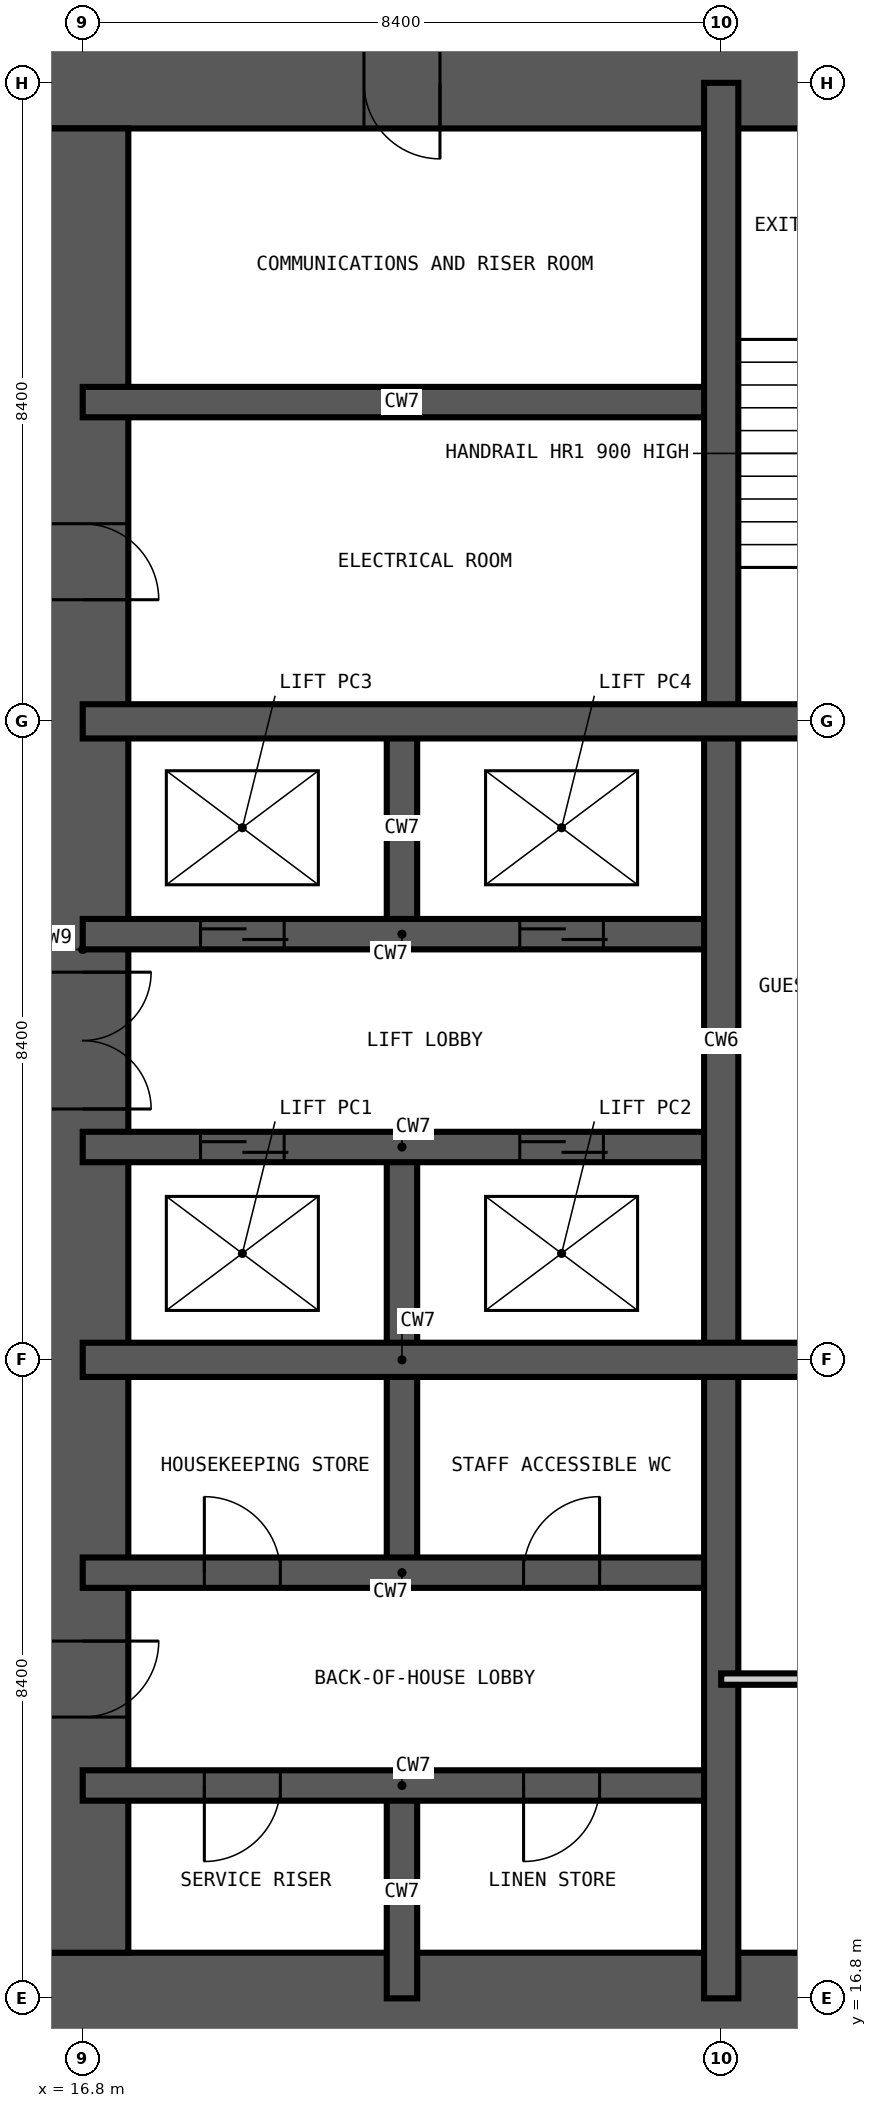
"""IFC4 building model, lengths in metres.
Left out: names, types, materials, properties, quantities, classifications, styles, units other than length and angle.
Written with IfcOpenShell. Run it as: python <this file> out.ifc"""

import sys

from ifc_helpers import new_model, si_unit, direction, frame, frame_2d, origin, place, context, subcontext, project, spatial, rectangle, extrude, element, fill, save


model = new_model("IFC4")
c1 = context("Model", 3, precision=1e-05, world=origin(), true_north=direction((0.0, 1.0)))
c2 = subcontext(c1, "Body", "Model", "MODEL_VIEW")
j1 = project(units=[si_unit("LENGTHUNIT", "METRE"), si_unit("PLANEANGLEUNIT", "RADIAN")], contexts=[c1])
p1 = place(None, origin())
s1 = spatial("IfcSite", under=j1, at=p1, CompositionType="ELEMENT")
p2 = place(p1, origin())
s2 = spatial("IfcBuilding", under=s1, at=p2, CompositionType="ELEMENT")
p3 = place(p2, frame((0.0, 0.0, 213.0)))
s3 = spatial("IfcBuildingStorey", under=s2, at=p3, CompositionType="ELEMENT", Elevation=213.0)
p4 = place(p3, frame((16.2, 16.8, -0.35), z_axis=(0.0, 0.0, 1.0), x_axis=(1.0, 0.0, 0.0)))
e1 = element("IfcWall", 1, at=p4, inside=s3, PredefinedType="SHEAR", context=c2, shape_type="SweptSolid", body=[
    extrude(rectangle(XDim=26.4, YDim=1.2, at=frame_2d((13.2, 0.0))), origin(), (0.0, 0.0, 1.0), 3.6),
])
p5 = place(p4, frame((12.7, 0.0, 0.35)))
e2 = element("IfcOpeningElement", 2, at=p5, cuts=e1, PredefinedType="OPENING", context=c2, shape_type="SweptSolid", body=[
    extrude(rectangle(XDim=1.0, YDim=2.1, at=frame_2d((0.5, 1.05))), frame((0.0, 0.61, 0.0), z_axis=(0.0, -1.0, 0.0), x_axis=(1.0, 0.0, 0.0)), (0.0, 0.0, 1.0), 1.22),
])
p6 = place(p4, frame((19.0, 0.0, 0.35)))
e3 = element("IfcOpeningElement", 3, at=p6, cuts=e1, PredefinedType="OPENING", context=c2, shape_type="SweptSolid", body=[
    extrude(rectangle(XDim=1.0, YDim=2.1, at=frame_2d((0.5, 1.05))), frame((0.0, 0.61, 0.0), z_axis=(0.0, -1.0, 0.0), x_axis=(1.0, 0.0, 0.0)), (0.0, 0.0, 1.0), 1.22),
])
p7 = place(p3, frame((42.6, 42.0, -0.35), z_axis=(0.0, 0.0, 1.0), x_axis=(-1.0, 0.0, 0.0)))
e4 = element("IfcWall", 4, at=p7, inside=s3, PredefinedType="SHEAR", context=c2, shape_type="SweptSolid", body=[
    extrude(rectangle(XDim=26.4, YDim=1.2, at=frame_2d((13.2, 0.0))), origin(), (0.0, 0.0, 1.0), 3.6),
])
p8 = place(p7, frame((21.1, 0.0, 0.35)))
e5 = element("IfcOpeningElement", 5, at=p8, cuts=e4, PredefinedType="OPENING", context=c2, shape_type="SweptSolid", body=[
    extrude(rectangle(XDim=1.0, YDim=2.1, at=frame_2d((0.5, 1.05))), frame((0.0, 0.61, 0.0), z_axis=(0.0, -1.0, 0.0), x_axis=(1.0, 0.0, 0.0)), (0.0, 0.0, 1.0), 1.22),
])
p9 = place(p7, frame((10.5, 0.0, 0.35)))
e6 = element("IfcOpeningElement", 6, at=p9, cuts=e4, PredefinedType="OPENING", context=c2, shape_type="SweptSolid", body=[
    extrude(rectangle(XDim=1.2, YDim=2.2, at=frame_2d((0.6, 1.1))), frame((0.0, 0.61, 0.0), z_axis=(0.0, -1.0, 0.0), x_axis=(1.0, 0.0, 0.0)), (0.0, 0.0, 1.0), 1.22),
])
p10 = place(p3, frame((16.8, 41.4, -0.35), z_axis=(0.0, 0.0, 1.0), x_axis=(0.0, -1.0, 0.0)))
e7 = element("IfcWall", 7, at=p10, inside=s3, PredefinedType="SHEAR", context=c2, shape_type="SweptSolid", body=[
    extrude(rectangle(XDim=24.0, YDim=1.2, at=frame_2d((12.0, 0.0))), origin(), (0.0, 0.0, 1.0), 3.6),
])
p11 = place(p10, frame((11.1, 0.0, 0.35)))
e8 = element("IfcOpeningElement", 8, at=p11, cuts=e7, PredefinedType="OPENING", context=c2, shape_type="SweptSolid", body=[
    extrude(rectangle(XDim=1.8, YDim=2.2, at=frame_2d((0.9, 1.1))), frame((0.0, 0.61, 0.0), z_axis=(0.0, -1.0, 0.0), x_axis=(1.0, 0.0, 0.0)), (0.0, 0.0, 1.0), 1.22),
])
p12 = place(p10, frame((19.9, 0.0, 0.35)))
e9 = element("IfcOpeningElement", 9, at=p12, cuts=e7, PredefinedType="OPENING", context=c2, shape_type="SweptSolid", body=[
    extrude(rectangle(XDim=1.0, YDim=2.1, at=frame_2d((0.5, 1.05))), frame((0.0, 0.61, 0.0), z_axis=(0.0, -1.0, 0.0), x_axis=(1.0, 0.0, 0.0)), (0.0, 0.0, 1.0), 1.22),
])
p13 = place(p10, frame((5.2, 0.0, 0.35)))
e10 = element("IfcOpeningElement", 10, at=p13, cuts=e7, PredefinedType="OPENING", context=c2, shape_type="SweptSolid", body=[
    extrude(rectangle(XDim=1.0, YDim=2.1, at=frame_2d((0.5, 1.05))), frame((0.0, 0.61, 0.0), z_axis=(0.0, -1.0, 0.0), x_axis=(1.0, 0.0, 0.0)), (0.0, 0.0, 1.0), 1.22),
])
p14 = place(p3, frame((21.0, 16.8, -0.35), z_axis=(0.0, 0.0, 1.0), x_axis=(0.0, 1.0, 0.0)))
e11 = element("IfcWall", 11, at=p14, inside=s3, PredefinedType="SHEAR", context=c2, shape_type="SweptSolid", body=[
    extrude(rectangle(XDim=2.8, YDim=0.4, at=frame_2d((1.4, 0.0))), origin(), (0.0, 0.0, 1.0), 3.6),
])
p15 = place(p3, frame((21.0, 22.4, -0.35), z_axis=(0.0, 0.0, 1.0), x_axis=(0.0, 1.0, 0.0)))
e12 = element("IfcWall", 12, at=p15, inside=s3, PredefinedType="SHEAR", context=c2, shape_type="SweptSolid", body=[
    extrude(rectangle(XDim=5.6, YDim=0.4, at=frame_2d((2.8, 0.0))), origin(), (0.0, 0.0, 1.0), 3.6),
])
p16 = place(p3, frame((21.0, 30.8, -0.35), z_axis=(0.0, 0.0, 1.0), x_axis=(0.0, 1.0, 0.0)))
e13 = element("IfcWall", 13, at=p16, inside=s3, PredefinedType="SHEAR", context=c2, shape_type="SweptSolid", body=[
    extrude(rectangle(XDim=2.8, YDim=0.4, at=frame_2d((1.4, 0.0))), origin(), (0.0, 0.0, 1.0), 3.6),
])
p17 = place(p3, frame((16.8, 19.6, -0.35), z_axis=(0.0, 0.0, 1.0), x_axis=(1.0, 0.0, 0.0)))
e14 = element("IfcWall", 14, at=p17, inside=s3, PredefinedType="SHEAR", context=c2, shape_type="SweptSolid", body=[
    extrude(rectangle(XDim=8.4, YDim=0.4, at=frame_2d((4.2, 0.0))), origin(), (0.0, 0.0, 1.0), 3.6),
])
p18 = place(p17, frame((1.6, 0.0, 0.35)))
e15 = element("IfcOpeningElement", 15, at=p18, cuts=e14, PredefinedType="OPENING", context=c2, shape_type="SweptSolid", body=[
    extrude(rectangle(XDim=1.0, YDim=2.1, at=frame_2d((0.5, 1.05))), frame((0.0, 0.21, 0.0), z_axis=(0.0, -1.0, 0.0), x_axis=(1.0, 0.0, 0.0)), (0.0, 0.0, 1.0), 0.42),
])
p19 = place(p17, frame((5.8, 0.0, 0.35)))
e16 = element("IfcOpeningElement", 16, at=p19, cuts=e14, PredefinedType="OPENING", context=c2, shape_type="SweptSolid", body=[
    extrude(rectangle(XDim=1.0, YDim=2.1, at=frame_2d((0.5, 1.05))), frame((0.0, 0.21, 0.0), z_axis=(0.0, -1.0, 0.0), x_axis=(1.0, 0.0, 0.0)), (0.0, 0.0, 1.0), 0.42),
])
p20 = place(p3, frame((16.8, 22.4, -0.35), z_axis=(0.0, 0.0, 1.0), x_axis=(1.0, 0.0, 0.0)))
e17 = element("IfcWall", 17, at=p20, inside=s3, PredefinedType="SHEAR", context=c2, shape_type="SweptSolid", body=[
    extrude(rectangle(XDim=8.4, YDim=0.4, at=frame_2d((4.2, 0.0))), origin(), (0.0, 0.0, 1.0), 3.6),
])
p21 = place(p20, frame((1.6, 0.0, 0.35)))
e18 = element("IfcOpeningElement", 18, at=p21, cuts=e17, PredefinedType="OPENING", context=c2, shape_type="SweptSolid", body=[
    extrude(rectangle(XDim=1.0, YDim=2.1, at=frame_2d((0.5, 1.05))), frame((0.0, 0.21, 0.0), z_axis=(0.0, -1.0, 0.0), x_axis=(1.0, 0.0, 0.0)), (0.0, 0.0, 1.0), 0.42),
])
p22 = place(p20, frame((5.8, 0.0, 0.35)))
e19 = element("IfcOpeningElement", 19, at=p22, cuts=e17, PredefinedType="OPENING", context=c2, shape_type="SweptSolid", body=[
    extrude(rectangle(XDim=1.0, YDim=2.1, at=frame_2d((0.5, 1.05))), frame((0.0, 0.21, 0.0), z_axis=(0.0, -1.0, 0.0), x_axis=(1.0, 0.0, 0.0)), (0.0, 0.0, 1.0), 0.42),
])
p23 = place(p3, frame((16.8, 28.0, -0.35), z_axis=(0.0, 0.0, 1.0), x_axis=(1.0, 0.0, 0.0)))
e20 = element("IfcWall", 20, at=p23, inside=s3, PredefinedType="SHEAR", context=c2, shape_type="SweptSolid", body=[
    extrude(rectangle(XDim=8.4, YDim=0.4, at=frame_2d((4.2, 0.0))), origin(), (0.0, 0.0, 1.0), 3.6),
])
p24 = place(p23, frame((1.55, 0.0, 0.35)))
e21 = element("IfcOpeningElement", 21, at=p24, cuts=e20, PredefinedType="OPENING", context=c2, shape_type="SweptSolid", body=[
    extrude(rectangle(XDim=1.1, YDim=2.2, at=frame_2d((0.55, 1.1))), frame((0.0, 0.21, 0.0), z_axis=(0.0, -1.0, 0.0), x_axis=(1.0, 0.0, 0.0)), (0.0, 0.0, 1.0), 0.42),
])
p25 = place(p23, frame((5.75, 0.0, 0.35)))
e22 = element("IfcOpeningElement", 22, at=p25, cuts=e20, PredefinedType="OPENING", context=c2, shape_type="SweptSolid", body=[
    extrude(rectangle(XDim=1.1, YDim=2.2, at=frame_2d((0.55, 1.1))), frame((0.0, 0.21, 0.0), z_axis=(0.0, -1.0, 0.0), x_axis=(1.0, 0.0, 0.0)), (0.0, 0.0, 1.0), 0.42),
])
p26 = place(p3, frame((16.8, 30.8, -0.35), z_axis=(0.0, 0.0, 1.0), x_axis=(1.0, 0.0, 0.0)))
e23 = element("IfcWall", 23, at=p26, inside=s3, PredefinedType="SHEAR", context=c2, shape_type="SweptSolid", body=[
    extrude(rectangle(XDim=8.4, YDim=0.4, at=frame_2d((4.2, 0.0))), origin(), (0.0, 0.0, 1.0), 3.6),
])
p27 = place(p26, frame((1.55, 0.0, 0.35)))
e24 = element("IfcOpeningElement", 24, at=p27, cuts=e23, PredefinedType="OPENING", context=c2, shape_type="SweptSolid", body=[
    extrude(rectangle(XDim=1.1, YDim=2.2, at=frame_2d((0.55, 1.1))), frame((0.0, 0.21, 0.0), z_axis=(0.0, -1.0, 0.0), x_axis=(1.0, 0.0, 0.0)), (0.0, 0.0, 1.0), 0.42),
])
p28 = place(p26, frame((5.75, 0.0, 0.35)))
e25 = element("IfcOpeningElement", 25, at=p28, cuts=e23, PredefinedType="OPENING", context=c2, shape_type="SweptSolid", body=[
    extrude(rectangle(XDim=1.1, YDim=2.2, at=frame_2d((0.55, 1.1))), frame((0.0, 0.21, 0.0), z_axis=(0.0, -1.0, 0.0), x_axis=(1.0, 0.0, 0.0)), (0.0, 0.0, 1.0), 0.42),
])
p29 = place(p3, frame((16.8, 37.8, -0.35), z_axis=(0.0, 0.0, 1.0), x_axis=(1.0, 0.0, 0.0)))
e26 = element("IfcWall", 26, at=p29, inside=s3, PredefinedType="SHEAR", context=c2, shape_type="SweptSolid", body=[
    extrude(rectangle(XDim=8.4, YDim=0.4, at=frame_2d((4.2, 0.0))), origin(), (0.0, 0.0, 1.0), 3.6),
])
for number, where, z_axis, x_axis in (
    (27, (25.2, 16.8, -0.35), (0.0, 0.0, 1.0), (0.0, 1.0, 0.0)),
    (28, (16.8, 25.2, -0.35), (0.0, 0.0, 1.0), (1.0, 0.0, 0.0)),
    (29, (16.8, 33.6, -0.35), (0.0, 0.0, 1.0), (1.0, 0.0, 0.0)),
):
    element("IfcWall", number, at=place(p3, frame(where, z_axis=z_axis, x_axis=x_axis)), inside=s3, PredefinedType="SHEAR", context=c2, shape_type="SweptSolid", body=[
        extrude(rectangle(XDim=25.2, YDim=0.45, at=frame_2d((12.6, 0.0))), origin(), (0.0, 0.0, 1.0), 3.6),
    ])
p30 = place(p3, frame((25.2, 21.0, 0.0), z_axis=(0.0, 0.0, 1.0), x_axis=(1.0, 0.0, 0.0)))
e30 = element("IfcWall", 30, at=p30, inside=s3, PredefinedType="PARTITIONING", context=c2, shape_type="SweptSolid", body=[
    extrude(rectangle(XDim=8.4, YDim=0.15, at=frame_2d((4.2, 0.0))), origin(), (0.0, 0.0, 1.0), 3.25),
])
p31 = place(p30, frame((3.7, 0.0, 0.0)))
e31 = element("IfcOpeningElement", 31, at=p31, cuts=e30, PredefinedType="OPENING", context=c2, shape_type="SweptSolid", body=[
    extrude(rectangle(XDim=1.0, YDim=2.1, at=frame_2d((0.5, 1.05))), frame((0.0, 0.085, 0.0), z_axis=(0.0, -1.0, 0.0), x_axis=(1.0, 0.0, 0.0)), (0.0, 0.0, 1.0), 0.17),
])
p32 = place(p24, origin())
e32 = element("IfcDoor", 32, at=p32, inside=s3, OperationType="DOUBLE_DOOR_SLIDING", PredefinedType="DOOR", context=c2, shape_type="SweptSolid", body=[
    extrude(rectangle(XDim=1.1, YDim=2.2, at=frame_2d((0.55, 1.1))), frame((0.0, 0.025, 0.0), z_axis=(0.0, -1.0, 0.0), x_axis=(1.0, 0.0, 0.0)), (0.0, 0.0, 1.0), 0.05),
])
fill(e21, e32)
p33 = place(p25, origin())
e33 = element("IfcDoor", 33, at=p33, inside=s3, OperationType="DOUBLE_DOOR_SLIDING", PredefinedType="DOOR", context=c2, shape_type="SweptSolid", body=[
    extrude(rectangle(XDim=1.1, YDim=2.2, at=frame_2d((0.55, 1.1))), frame((0.0, 0.025, 0.0), z_axis=(0.0, -1.0, 0.0), x_axis=(1.0, 0.0, 0.0)), (0.0, 0.0, 1.0), 0.05),
])
fill(e22, e33)
p34 = place(p27, origin())
e34 = element("IfcDoor", 34, at=p34, inside=s3, OperationType="DOUBLE_DOOR_SLIDING", PredefinedType="DOOR", context=c2, shape_type="SweptSolid", body=[
    extrude(rectangle(XDim=1.1, YDim=2.2, at=frame_2d((0.55, 1.1))), frame((0.0, 0.025, 0.0), z_axis=(0.0, -1.0, 0.0), x_axis=(1.0, 0.0, 0.0)), (0.0, 0.0, 1.0), 0.05),
])
fill(e24, e34)
p35 = place(p28, origin())
e35 = element("IfcDoor", 35, at=p35, inside=s3, OperationType="DOUBLE_DOOR_SLIDING", PredefinedType="DOOR", context=c2, shape_type="SweptSolid", body=[
    extrude(rectangle(XDim=1.1, YDim=2.2, at=frame_2d((0.55, 1.1))), frame((0.0, 0.025, 0.0), z_axis=(0.0, -1.0, 0.0), x_axis=(1.0, 0.0, 0.0)), (0.0, 0.0, 1.0), 0.05),
])
fill(e25, e35)
p36 = place(p11, origin())
e36 = element("IfcDoor", 36, at=p36, inside=s3, OperationType="DOUBLE_DOOR_DOUBLE_SWING", PredefinedType="DOOR", context=c2, shape_type="SweptSolid", body=[
    extrude(rectangle(XDim=1.8, YDim=2.2, at=frame_2d((0.9, 1.1))), frame((0.0, 0.025, 0.0), z_axis=(0.0, -1.0, 0.0), x_axis=(1.0, 0.0, 0.0)), (0.0, 0.0, 1.0), 0.05),
])
fill(e8, e36)
p37 = place(p18, frame((1.0, 0.0, 0.0), z_axis=(0.0, 0.0, 1.0), x_axis=(-1.0, 0.0, 0.0)))
e37 = element("IfcDoor", 37, at=p37, inside=s3, OperationType="SINGLE_SWING_RIGHT", PredefinedType="DOOR", context=c2, shape_type="SweptSolid", body=[
    extrude(rectangle(XDim=1.0, YDim=2.1, at=frame_2d((0.5, 1.05))), frame((0.0, 0.025, 0.0), z_axis=(0.0, -1.0, 0.0), x_axis=(1.0, 0.0, 0.0)), (0.0, 0.0, 1.0), 0.05),
])
fill(e15, e37)
p38 = place(p19, frame((1.0, 0.0, 0.0), z_axis=(0.0, 0.0, 1.0), x_axis=(-1.0, 0.0, 0.0)))
e38 = element("IfcDoor", 38, at=p38, inside=s3, OperationType="SINGLE_SWING_RIGHT", PredefinedType="DOOR", context=c2, shape_type="SweptSolid", body=[
    extrude(rectangle(XDim=1.0, YDim=2.1, at=frame_2d((0.5, 1.05))), frame((0.0, 0.025, 0.0), z_axis=(0.0, -1.0, 0.0), x_axis=(1.0, 0.0, 0.0)), (0.0, 0.0, 1.0), 0.05),
])
fill(e16, e38)
p39 = place(p21, origin())
e39 = element("IfcDoor", 39, at=p39, inside=s3, OperationType="SINGLE_SWING_LEFT", PredefinedType="DOOR", context=c2, shape_type="SweptSolid", body=[
    extrude(rectangle(XDim=1.0, YDim=2.1, at=frame_2d((0.5, 1.05))), frame((0.0, 0.025, 0.0), z_axis=(0.0, -1.0, 0.0), x_axis=(1.0, 0.0, 0.0)), (0.0, 0.0, 1.0), 0.05),
])
fill(e18, e39)
p40 = place(p22, origin())
e40 = element("IfcDoor", 40, at=p40, inside=s3, OperationType="SINGLE_SWING_RIGHT", PredefinedType="DOOR", context=c2, shape_type="SweptSolid", body=[
    extrude(rectangle(XDim=1.0, YDim=2.1, at=frame_2d((0.5, 1.05))), frame((0.0, 0.025, 0.0), z_axis=(0.0, -1.0, 0.0), x_axis=(1.0, 0.0, 0.0)), (0.0, 0.0, 1.0), 0.05),
])
fill(e19, e40)
p41 = place(p12, origin())
e41 = element("IfcDoor", 41, at=p41, inside=s3, OperationType="SINGLE_SWING_LEFT", PredefinedType="DOOR", context=c2, shape_type="SweptSolid", body=[
    extrude(rectangle(XDim=1.0, YDim=2.1, at=frame_2d((0.5, 1.05))), frame((0.0, 0.025, 0.0), z_axis=(0.0, -1.0, 0.0), x_axis=(1.0, 0.0, 0.0)), (0.0, 0.0, 1.0), 0.05),
])
fill(e9, e41)
p42 = place(p13, origin())
e42 = element("IfcDoor", 42, at=p42, inside=s3, OperationType="SINGLE_SWING_RIGHT", PredefinedType="DOOR", context=c2, shape_type="SweptSolid", body=[
    extrude(rectangle(XDim=1.0, YDim=2.1, at=frame_2d((0.5, 1.05))), frame((0.0, 0.025, 0.0), z_axis=(0.0, -1.0, 0.0), x_axis=(1.0, 0.0, 0.0)), (0.0, 0.0, 1.0), 0.05),
])
fill(e10, e42)
p43 = place(p8, origin())
e43 = element("IfcDoor", 43, at=p43, inside=s3, OperationType="SINGLE_SWING_LEFT", PredefinedType="DOOR", context=c2, shape_type="SweptSolid", body=[
    extrude(rectangle(XDim=1.0, YDim=2.1, at=frame_2d((0.5, 1.05))), frame((0.0, 0.025, 0.0), z_axis=(0.0, -1.0, 0.0), x_axis=(1.0, 0.0, 0.0)), (0.0, 0.0, 1.0), 0.05),
])
fill(e5, e43)
save(model, sys.argv[1])
